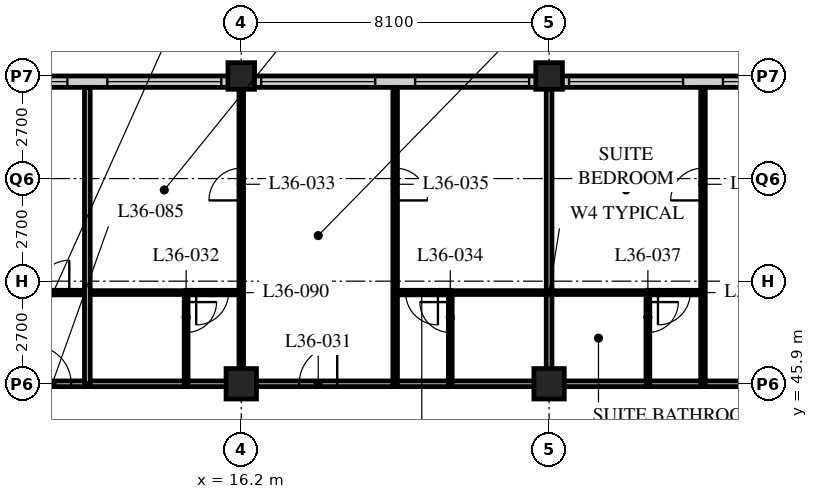
"""IFC4 building model, lengths in metres.
Left out: names, types, materials, properties, quantities, classifications, styles, units other than length and angle.
Written with IfcOpenShell. Run it as: python <this file> out.ifc"""

import sys

from ifc_helpers import new_model, si_unit, direction, frame, frame_2d, origin, origin_2d, place, context, subcontext, project, spatial, rectangle, hollow_rectangle, extrude, element, fill, save


model = new_model("IFC4")
c1 = context("Model", 3, precision=1e-05, world=origin(), true_north=direction((0.0, 1.0)))
c2 = subcontext(c1, "Body", "Model", "MODEL_VIEW")
j1 = project(units=[si_unit("LENGTHUNIT", "METRE"), si_unit("PLANEANGLEUNIT", "RADIAN")], contexts=[c1])
p1 = place(None, origin())
s1 = spatial("IfcSite", under=j1, at=p1, CompositionType="ELEMENT")
p2 = place(p1, origin())
s2 = spatial("IfcBuilding", under=s1, at=p2, CompositionType="ELEMENT")
p3 = place(p2, frame((0.0, 0.0, 140.8)))
s3 = spatial("IfcBuildingStorey", under=s2, at=p3, CompositionType="ELEMENT", Elevation=140.8)
p4 = place(p3, frame((16.2, 45.9, 0.0), z_axis=(0.0, 0.0, 1.0), x_axis=(1.0, 0.0, 0.0)))
e1 = element("IfcColumn", 1, at=p4, inside=s3, PredefinedType="COLUMN", context=c2, shape_type="SweptSolid", body=[
    extrude(hollow_rectangle(XDim=0.8, YDim=0.8, WallThickness=0.08, at=origin_2d()), origin(), (0.0, 0.0, 1.0), 3.4),
])
p5 = place(p3, frame((16.2, 54.0, 0.0), z_axis=(0.0, 0.0, 1.0), x_axis=(1.0, 0.0, 0.0)))
e2 = element("IfcColumn", 2, at=p5, inside=s3, PredefinedType="COLUMN", context=c2, shape_type="SweptSolid", body=[
    extrude(hollow_rectangle(XDim=0.7, YDim=0.7, WallThickness=0.07, at=origin_2d()), origin(), (0.0, 0.0, 1.0), 3.4),
])
p6 = place(p3, frame((24.3, 45.9, 0.0), z_axis=(0.0, 0.0, 1.0), x_axis=(1.0, 0.0, 0.0)))
e3 = element("IfcColumn", 3, at=p6, inside=s3, PredefinedType="COLUMN", context=c2, shape_type="SweptSolid", body=[
    extrude(hollow_rectangle(XDim=0.8, YDim=0.8, WallThickness=0.08, at=origin_2d()), origin(), (0.0, 0.0, 1.0), 3.4),
])
p7 = place(p3, frame((24.3, 54.0, 0.0), z_axis=(0.0, 0.0, 1.0), x_axis=(1.0, 0.0, 0.0)))
e4 = element("IfcColumn", 4, at=p7, inside=s3, PredefinedType="COLUMN", context=c2, shape_type="SweptSolid", body=[
    extrude(hollow_rectangle(XDim=0.7, YDim=0.7, WallThickness=0.07, at=origin_2d()), origin(), (0.0, 0.0, 1.0), 3.4),
])
p8 = place(p3, frame((48.3, 53.85, 0.0), z_axis=(0.0, 0.0, 1.0), x_axis=(-1.0, 0.0, 0.0)))
e5 = element("IfcWall", 5, at=p8, inside=s3, PredefinedType="SOLIDWALL", context=c2, shape_type="SweptSolid", body=[
    extrude(rectangle(XDim=40.2, YDim=0.3, at=frame_2d((20.1, 0.0))), origin(), (0.0, 0.0, 1.0), 3.19),
])
p9 = place(p8, frame((0.225, 0.0, 0.9)))
e6 = element("IfcOpeningElement", 6, at=p9, cuts=e5, PredefinedType="OPENING", context=c2, shape_type="SweptSolid", body=[
    extrude(rectangle(XDim=3.0, YDim=2.0, at=frame_2d((1.5, 1.0))), frame((0.0, 0.16, 0.0), z_axis=(0.0, -1.0, 0.0), x_axis=(1.0, 0.0, 0.0)), (0.0, 0.0, 1.0), 0.32),
])
p10 = place(p8, frame((4.275, 0.0, 0.9)))
e7 = element("IfcOpeningElement", 7, at=p10, cuts=e5, PredefinedType="OPENING", context=c2, shape_type="SweptSolid", body=[
    extrude(rectangle(XDim=3.0, YDim=2.0, at=frame_2d((1.5, 1.0))), frame((0.0, 0.16, 0.0), z_axis=(0.0, -1.0, 0.0), x_axis=(1.0, 0.0, 0.0)), (0.0, 0.0, 1.0), 0.32),
])
p11 = place(p8, frame((8.325, 0.0, 0.9)))
e8 = element("IfcOpeningElement", 8, at=p11, cuts=e5, PredefinedType="OPENING", context=c2, shape_type="SweptSolid", body=[
    extrude(rectangle(XDim=3.0, YDim=2.0, at=frame_2d((1.5, 1.0))), frame((0.0, 0.16, 0.0), z_axis=(0.0, -1.0, 0.0), x_axis=(1.0, 0.0, 0.0)), (0.0, 0.0, 1.0), 0.32),
])
p12 = place(p8, frame((12.375, 0.0, 0.9)))
e9 = element("IfcOpeningElement", 9, at=p12, cuts=e5, PredefinedType="OPENING", context=c2, shape_type="SweptSolid", body=[
    extrude(rectangle(XDim=3.0, YDim=2.0, at=frame_2d((1.5, 1.0))), frame((0.0, 0.16, 0.0), z_axis=(0.0, -1.0, 0.0), x_axis=(1.0, 0.0, 0.0)), (0.0, 0.0, 1.0), 0.32),
])
p13 = place(p8, frame((16.425, 0.0, 0.9)))
e10 = element("IfcOpeningElement", 10, at=p13, cuts=e5, PredefinedType="OPENING", context=c2, shape_type="SweptSolid", body=[
    extrude(rectangle(XDim=3.0, YDim=2.0, at=frame_2d((1.5, 1.0))), frame((0.0, 0.16, 0.0), z_axis=(0.0, -1.0, 0.0), x_axis=(1.0, 0.0, 0.0)), (0.0, 0.0, 1.0), 0.32),
])
p14 = place(p8, frame((20.475, 0.0, 0.9)))
e11 = element("IfcOpeningElement", 11, at=p14, cuts=e5, PredefinedType="OPENING", context=c2, shape_type="SweptSolid", body=[
    extrude(rectangle(XDim=3.0, YDim=2.0, at=frame_2d((1.5, 1.0))), frame((0.0, 0.16, 0.0), z_axis=(0.0, -1.0, 0.0), x_axis=(1.0, 0.0, 0.0)), (0.0, 0.0, 1.0), 0.32),
])
p15 = place(p8, frame((24.525, 0.0, 0.9)))
e12 = element("IfcOpeningElement", 12, at=p15, cuts=e5, PredefinedType="OPENING", context=c2, shape_type="SweptSolid", body=[
    extrude(rectangle(XDim=3.0, YDim=2.0, at=frame_2d((1.5, 1.0))), frame((0.0, 0.16, 0.0), z_axis=(0.0, -1.0, 0.0), x_axis=(1.0, 0.0, 0.0)), (0.0, 0.0, 1.0), 0.32),
])
p16 = place(p8, frame((28.575, 0.0, 0.9)))
e13 = element("IfcOpeningElement", 13, at=p16, cuts=e5, PredefinedType="OPENING", context=c2, shape_type="SweptSolid", body=[
    extrude(rectangle(XDim=3.0, YDim=2.0, at=frame_2d((1.5, 1.0))), frame((0.0, 0.16, 0.0), z_axis=(0.0, -1.0, 0.0), x_axis=(1.0, 0.0, 0.0)), (0.0, 0.0, 1.0), 0.32),
])
p17 = place(p8, frame((32.625, 0.0, 0.9)))
e14 = element("IfcOpeningElement", 14, at=p17, cuts=e5, PredefinedType="OPENING", context=c2, shape_type="SweptSolid", body=[
    extrude(rectangle(XDim=3.0, YDim=2.0, at=frame_2d((1.5, 1.0))), frame((0.0, 0.16, 0.0), z_axis=(0.0, -1.0, 0.0), x_axis=(1.0, 0.0, 0.0)), (0.0, 0.0, 1.0), 0.32),
])
p18 = place(p8, frame((36.675, 0.0, 0.9)))
e15 = element("IfcOpeningElement", 15, at=p18, cuts=e5, PredefinedType="OPENING", context=c2, shape_type="SweptSolid", body=[
    extrude(rectangle(XDim=3.0, YDim=2.0, at=frame_2d((1.5, 1.0))), frame((0.0, 0.16, 0.0), z_axis=(0.0, -1.0, 0.0), x_axis=(1.0, 0.0, 0.0)), (0.0, 0.0, 1.0), 0.32),
])
p19 = place(p3, frame((8.1, 45.9, 0.0), z_axis=(0.0, 0.0, 1.0), x_axis=(1.0, 0.0, 0.0)))
e16 = element("IfcWall", 16, at=p19, inside=s3, PredefinedType="PARTITIONING", context=c2, shape_type="SweptSolid", body=[
    extrude(rectangle(XDim=36.45, YDim=0.15, at=frame_2d((18.225, 0.0))), origin(), (0.0, 0.0, 1.0), 2.578),
])
p20 = place(p19, frame((9.625, 0.0, 0.0)))
e17 = element("IfcOpeningElement", 17, at=p20, cuts=e16, PredefinedType="OPENING", context=c2, shape_type="SweptSolid", body=[
    extrude(rectangle(XDim=1.0, YDim=2.1, at=frame_2d((0.5, 1.05))), frame((0.0, 0.085, 0.0), z_axis=(0.0, -1.0, 0.0), x_axis=(1.0, 0.0, 0.0)), (0.0, 0.0, 1.0), 0.17),
])
p21 = place(p19, frame((21.775, 0.0, 0.0)))
e18 = element("IfcOpeningElement", 18, at=p21, cuts=e16, PredefinedType="OPENING", context=c2, shape_type="SweptSolid", body=[
    extrude(rectangle(XDim=1.0, YDim=2.1, at=frame_2d((0.5, 1.05))), frame((0.0, 0.085, 0.0), z_axis=(0.0, -1.0, 0.0), x_axis=(1.0, 0.0, 0.0)), (0.0, 0.0, 1.0), 0.17),
])
p22 = place(p19, frame((28.95, 0.0, 0.0)))
e19 = element("IfcOpeningElement", 19, at=p22, cuts=e16, PredefinedType="OPENING", context=c2, shape_type="SweptSolid", body=[
    extrude(rectangle(XDim=1.0, YDim=2.1, at=frame_2d((0.5, 1.05))), frame((0.0, 0.085, 0.0), z_axis=(0.0, -1.0, 0.0), x_axis=(1.0, 0.0, 0.0)), (0.0, 0.0, 1.0), 0.17),
])
p23 = place(p19, frame((33.925, 0.0, 0.0)))
e20 = element("IfcOpeningElement", 20, at=p23, cuts=e16, PredefinedType="OPENING", context=c2, shape_type="SweptSolid", body=[
    extrude(rectangle(XDim=1.0, YDim=2.1, at=frame_2d((0.5, 1.05))), frame((0.0, 0.085, 0.0), z_axis=(0.0, -1.0, 0.0), x_axis=(1.0, 0.0, 0.0)), (0.0, 0.0, 1.0), 0.17),
])
p24 = place(p19, frame((2.625, 0.0, 0.0)))
e21 = element("IfcOpeningElement", 21, at=p24, cuts=e16, PredefinedType="OPENING", context=c2, shape_type="SweptSolid", body=[
    extrude(rectangle(XDim=1.0, YDim=2.1, at=frame_2d((0.5, 1.05))), frame((0.0, 0.085, 0.0), z_axis=(0.0, -1.0, 0.0), x_axis=(1.0, 0.0, 0.0)), (0.0, 0.0, 1.0), 0.17),
])
p25 = place(p3, frame((12.15, 48.3, 0.0), z_axis=(0.0, 0.0, 1.0), x_axis=(1.0, 0.0, 0.0)))
e22 = element("IfcWall", 22, at=p25, inside=s3, PredefinedType="PARTITIONING", context=c2, shape_type="SweptSolid", body=[
    extrude(rectangle(XDim=2.6, YDim=0.1, at=frame_2d((1.3, 0.0))), origin(), (0.0, 0.0, 1.0), 3.19),
])
p26 = place(p3, frame((14.75, 45.9, 0.0), z_axis=(0.0, 0.0, 1.0), x_axis=(0.0, 1.0, 0.0)))
e23 = element("IfcWall", 23, at=p26, inside=s3, PredefinedType="PARTITIONING", context=c2, shape_type="SweptSolid", body=[
    extrude(rectangle(XDim=2.4, YDim=0.1, at=frame_2d((1.2, 0.0))), origin(), (0.0, 0.0, 1.0), 3.19),
])
p27 = place(p26, frame((1.35, 0.0, 0.0)))
e24 = element("IfcOpeningElement", 24, at=p27, cuts=e23, PredefinedType="OPENING", context=c2, shape_type="SweptSolid", body=[
    extrude(rectangle(XDim=0.8, YDim=2.1, at=frame_2d((0.4, 1.05))), frame((0.0, 0.06, 0.0), z_axis=(0.0, -1.0, 0.0), x_axis=(1.0, 0.0, 0.0)), (0.0, 0.0, 1.0), 0.12),
])
p28 = place(p3, frame((16.2, 45.9, 0.0), z_axis=(0.0, 0.0, 1.0), x_axis=(0.0, 1.0, 0.0)))
e25 = element("IfcWall", 25, at=p28, inside=s3, PredefinedType="PARTITIONING", context=c2, shape_type="SweptSolid", body=[
    extrude(rectangle(XDim=7.8, YDim=0.12, at=frame_2d((3.9, 0.0))), origin(), (0.0, 0.0, 1.0), 2.578),
])
p29 = place(p28, frame((4.825, 0.0, 0.0)))
e26 = element("IfcOpeningElement", 26, at=p29, cuts=e25, PredefinedType="OPENING", context=c2, shape_type="SweptSolid", body=[
    extrude(rectangle(XDim=0.85, YDim=2.1, at=frame_2d((0.425, 1.05))), frame((0.0, 0.07, 0.0), z_axis=(0.0, -1.0, 0.0), x_axis=(1.0, 0.0, 0.0)), (0.0, 0.0, 1.0), 0.14),
])
p30 = place(p3, frame((21.7, 48.3, 0.0), z_axis=(0.0, 0.0, 1.0), x_axis=(1.0, 0.0, 0.0)))
e27 = element("IfcWall", 27, at=p30, inside=s3, PredefinedType="PARTITIONING", context=c2, shape_type="SweptSolid", body=[
    extrude(rectangle(XDim=5.2, YDim=0.1, at=frame_2d((2.6, 0.0))), origin(), (0.0, 0.0, 1.0), 3.19),
])
p31 = place(p3, frame((21.7, 45.9, 0.0), z_axis=(0.0, 0.0, 1.0), x_axis=(0.0, 1.0, 0.0)))
e28 = element("IfcWall", 28, at=p31, inside=s3, PredefinedType="PARTITIONING", context=c2, shape_type="SweptSolid", body=[
    extrude(rectangle(XDim=2.4, YDim=0.1, at=frame_2d((1.2, 0.0))), origin(), (0.0, 0.0, 1.0), 3.19),
])
p32 = place(p31, frame((1.35, 0.0, 0.0)))
e29 = element("IfcOpeningElement", 29, at=p32, cuts=e28, PredefinedType="OPENING", context=c2, shape_type="SweptSolid", body=[
    extrude(rectangle(XDim=0.8, YDim=2.1, at=frame_2d((0.4, 1.05))), frame((0.0, 0.06, 0.0), z_axis=(0.0, -1.0, 0.0), x_axis=(1.0, 0.0, 0.0)), (0.0, 0.0, 1.0), 0.12),
])
p33 = place(p3, frame((20.25, 45.9, 0.0), z_axis=(0.0, 0.0, 1.0), x_axis=(0.0, 1.0, 0.0)))
e30 = element("IfcWall", 30, at=p33, inside=s3, PredefinedType="PARTITIONING", context=c2, shape_type="SweptSolid", body=[
    extrude(rectangle(XDim=7.8, YDim=0.12, at=frame_2d((3.9, 0.0))), origin(), (0.0, 0.0, 1.0), 3.19),
])
p34 = place(p33, frame((4.825, 0.0, 0.0)))
e31 = element("IfcOpeningElement", 31, at=p34, cuts=e30, PredefinedType="OPENING", context=c2, shape_type="SweptSolid", body=[
    extrude(rectangle(XDim=0.85, YDim=2.1, at=frame_2d((0.425, 1.05))), frame((0.0, 0.07, 0.0), z_axis=(0.0, -1.0, 0.0), x_axis=(1.0, 0.0, 0.0)), (0.0, 0.0, 1.0), 0.14),
])
p35 = place(p3, frame((24.3, 45.9, 0.0), z_axis=(0.0, 0.0, 1.0), x_axis=(0.0, 1.0, 0.0)))
e32 = element("IfcWall", 32, at=p35, inside=s3, PredefinedType="PARTITIONING", context=c2, shape_type="SweptSolid", body=[
    extrude(rectangle(XDim=7.8, YDim=0.15, at=frame_2d((3.9, 0.0))), origin(), (0.0, 0.0, 1.0), 2.578),
])
p36 = place(p3, frame((26.9, 45.9, 0.0), z_axis=(0.0, 0.0, 1.0), x_axis=(0.0, 1.0, 0.0)))
e33 = element("IfcWall", 33, at=p36, inside=s3, PredefinedType="PARTITIONING", context=c2, shape_type="SweptSolid", body=[
    extrude(rectangle(XDim=2.4, YDim=0.1, at=frame_2d((1.2, 0.0))), origin(), (0.0, 0.0, 1.0), 3.19),
])
p37 = place(p36, frame((1.35, 0.0, 0.0)))
e34 = element("IfcOpeningElement", 34, at=p37, cuts=e33, PredefinedType="OPENING", context=c2, shape_type="SweptSolid", body=[
    extrude(rectangle(XDim=0.8, YDim=2.1, at=frame_2d((0.4, 1.05))), frame((0.0, 0.06, 0.0), z_axis=(0.0, -1.0, 0.0), x_axis=(1.0, 0.0, 0.0)), (0.0, 0.0, 1.0), 0.12),
])
p38 = place(p3, frame((28.35, 45.9, 0.0), z_axis=(0.0, 0.0, 1.0), x_axis=(0.0, 1.0, 0.0)))
e35 = element("IfcWall", 35, at=p38, inside=s3, PredefinedType="PARTITIONING", context=c2, shape_type="SweptSolid", body=[
    extrude(rectangle(XDim=7.8, YDim=0.12, at=frame_2d((3.9, 0.0))), origin(), (0.0, 0.0, 1.0), 3.19),
])
p39 = place(p38, frame((4.825, 0.0, 0.0)))
e36 = element("IfcOpeningElement", 36, at=p39, cuts=e35, PredefinedType="OPENING", context=c2, shape_type="SweptSolid", body=[
    extrude(rectangle(XDim=0.85, YDim=2.1, at=frame_2d((0.425, 1.05))), frame((0.0, 0.07, 0.0), z_axis=(0.0, -1.0, 0.0), x_axis=(1.0, 0.0, 0.0)), (0.0, 0.0, 1.0), 0.14),
])
p40 = place(p3, frame((8.1, 48.3, 0.0), z_axis=(0.0, 0.0, 1.0), x_axis=(1.0, 0.0, 0.0)))
e37 = element("IfcWall", 37, at=p40, inside=s3, PredefinedType="PARTITIONING", context=c2, shape_type="SweptSolid", body=[
    extrude(rectangle(XDim=4.05, YDim=0.12, at=frame_2d((2.025, 0.0))), origin(), (0.0, 0.0, 1.0), 3.19),
])
p41 = place(p40, frame((2.725, 0.0, 0.0)))
e38 = element("IfcOpeningElement", 38, at=p41, cuts=e37, PredefinedType="OPENING", context=c2, shape_type="SweptSolid", body=[
    extrude(rectangle(XDim=0.85, YDim=2.1, at=frame_2d((0.425, 1.05))), frame((0.0, 0.07, 0.0), z_axis=(0.0, -1.0, 0.0), x_axis=(1.0, 0.0, 0.0)), (0.0, 0.0, 1.0), 0.14),
])
p42 = place(p3, frame((12.15, 45.9, 0.0), z_axis=(0.0, 0.0, 1.0), x_axis=(0.0, 1.0, 0.0)))
e39 = element("IfcWall", 39, at=p42, inside=s3, PredefinedType="PARTITIONING", context=c2, shape_type="SweptSolid", body=[
    extrude(rectangle(XDim=7.8, YDim=0.15, at=frame_2d((3.9, 0.0))), origin(), (0.0, 0.0, 1.0), 3.19),
])
p43 = place(p3, frame((14.74, 48.3, 0.0), z_axis=(0.0, 0.0, 1.0), x_axis=(1.0, 0.0, 0.0)))
e40 = element("IfcWall", 40, at=p43, inside=s3, PredefinedType="PARTITIONING", context=c2, shape_type="SweptSolid", body=[
    extrude(rectangle(XDim=1.46, YDim=0.12, at=frame_2d((0.73, 0.0))), origin(), (0.0, 0.0, 1.0), 3.19),
])
p44 = place(p43, frame((0.275, 0.0, 0.0)))
e41 = element("IfcOpeningElement", 41, at=p44, cuts=e40, PredefinedType="OPENING", context=c2, shape_type="SweptSolid", body=[
    extrude(rectangle(XDim=0.85, YDim=2.1, at=frame_2d((0.425, 1.05))), frame((0.0, 0.07, 0.0), z_axis=(0.0, -1.0, 0.0), x_axis=(1.0, 0.0, 0.0)), (0.0, 0.0, 1.0), 0.14),
])
p45 = place(p3, frame((20.25, 48.3, 0.0), z_axis=(0.0, 0.0, 1.0), x_axis=(1.0, 0.0, 0.0)))
e42 = element("IfcWall", 42, at=p45, inside=s3, PredefinedType="PARTITIONING", context=c2, shape_type="SweptSolid", body=[
    extrude(rectangle(XDim=1.46, YDim=0.12, at=frame_2d((0.73, 0.0))), origin(), (0.0, 0.0, 1.0), 3.19),
])
p46 = place(p45, frame((0.275, 0.0, 0.0)))
e43 = element("IfcOpeningElement", 43, at=p46, cuts=e42, PredefinedType="OPENING", context=c2, shape_type="SweptSolid", body=[
    extrude(rectangle(XDim=0.85, YDim=2.1, at=frame_2d((0.425, 1.05))), frame((0.0, 0.07, 0.0), z_axis=(0.0, -1.0, 0.0), x_axis=(1.0, 0.0, 0.0)), (0.0, 0.0, 1.0), 0.14),
])
p47 = place(p3, frame((26.89, 48.3, 0.0), z_axis=(0.0, 0.0, 1.0), x_axis=(1.0, 0.0, 0.0)))
e44 = element("IfcWall", 44, at=p47, inside=s3, PredefinedType="PARTITIONING", context=c2, shape_type="SweptSolid", body=[
    extrude(rectangle(XDim=1.46, YDim=0.12, at=frame_2d((0.73, 0.0))), origin(), (0.0, 0.0, 1.0), 3.19),
])
p48 = place(p47, frame((0.275, 0.0, 0.0)))
e45 = element("IfcOpeningElement", 45, at=p48, cuts=e44, PredefinedType="OPENING", context=c2, shape_type="SweptSolid", body=[
    extrude(rectangle(XDim=0.85, YDim=2.1, at=frame_2d((0.425, 1.05))), frame((0.0, 0.07, 0.0), z_axis=(0.0, -1.0, 0.0), x_axis=(1.0, 0.0, 0.0)), (0.0, 0.0, 1.0), 0.14),
])
p49 = place(p13, origin())
e46 = element("IfcWindow", 46, at=p49, inside=s3, PartitioningType="SINGLE_PANEL", PredefinedType="WINDOW", context=c2, shape_type="SweptSolid", body=[
    extrude(rectangle(XDim=3.0, YDim=2.0, at=frame_2d((1.5, 1.0))), frame((0.0, 0.03, 0.0), z_axis=(0.0, -1.0, 0.0), x_axis=(1.0, 0.0, 0.0)), (0.0, 0.0, 1.0), 0.06),
])
fill(e10, e46)
p50 = place(p14, origin())
e47 = element("IfcWindow", 47, at=p50, inside=s3, PartitioningType="SINGLE_PANEL", PredefinedType="WINDOW", context=c2, shape_type="SweptSolid", body=[
    extrude(rectangle(XDim=3.0, YDim=2.0, at=frame_2d((1.5, 1.0))), frame((0.0, 0.03, 0.0), z_axis=(0.0, -1.0, 0.0), x_axis=(1.0, 0.0, 0.0)), (0.0, 0.0, 1.0), 0.06),
])
fill(e11, e47)
p51 = place(p15, origin())
e48 = element("IfcWindow", 48, at=p51, inside=s3, PartitioningType="SINGLE_PANEL", PredefinedType="WINDOW", context=c2, shape_type="SweptSolid", body=[
    extrude(rectangle(XDim=3.0, YDim=2.0, at=frame_2d((1.5, 1.0))), frame((0.0, 0.03, 0.0), z_axis=(0.0, -1.0, 0.0), x_axis=(1.0, 0.0, 0.0)), (0.0, 0.0, 1.0), 0.06),
])
fill(e12, e48)
p52 = place(p16, origin())
e49 = element("IfcWindow", 49, at=p52, inside=s3, PartitioningType="SINGLE_PANEL", PredefinedType="WINDOW", context=c2, shape_type="SweptSolid", body=[
    extrude(rectangle(XDim=3.0, YDim=2.0, at=frame_2d((1.5, 1.0))), frame((0.0, 0.03, 0.0), z_axis=(0.0, -1.0, 0.0), x_axis=(1.0, 0.0, 0.0)), (0.0, 0.0, 1.0), 0.06),
])
fill(e13, e49)
p53 = place(p17, origin())
e50 = element("IfcWindow", 50, at=p53, inside=s3, PartitioningType="SINGLE_PANEL", PredefinedType="WINDOW", context=c2, shape_type="SweptSolid", body=[
    extrude(rectangle(XDim=3.0, YDim=2.0, at=frame_2d((1.5, 1.0))), frame((0.0, 0.03, 0.0), z_axis=(0.0, -1.0, 0.0), x_axis=(1.0, 0.0, 0.0)), (0.0, 0.0, 1.0), 0.06),
])
fill(e14, e50)
p54 = place(p18, origin())
e51 = element("IfcWindow", 51, at=p54, inside=s3, PartitioningType="SINGLE_PANEL", PredefinedType="WINDOW", context=c2, shape_type="SweptSolid", body=[
    extrude(rectangle(XDim=3.0, YDim=2.0, at=frame_2d((1.5, 1.0))), frame((0.0, 0.03, 0.0), z_axis=(0.0, -1.0, 0.0), x_axis=(1.0, 0.0, 0.0)), (0.0, 0.0, 1.0), 0.06),
])
fill(e15, e51)
p55 = place(p20, origin())
e52 = element("IfcDoor", 52, at=p55, inside=s3, OperationType="SINGLE_SWING_RIGHT", PredefinedType="DOOR", context=c2, shape_type="SweptSolid", body=[
    extrude(rectangle(XDim=1.0, YDim=2.1, at=frame_2d((0.5, 1.05))), frame((0.0, 0.025, 0.0), z_axis=(0.0, -1.0, 0.0), x_axis=(1.0, 0.0, 0.0)), (0.0, 0.0, 1.0), 0.05),
])
fill(e17, e52)
p56 = place(p27, origin())
e53 = element("IfcDoor", 53, at=p56, inside=s3, OperationType="SINGLE_SWING_LEFT", PredefinedType="DOOR", context=c2, shape_type="SweptSolid", body=[
    extrude(rectangle(XDim=0.8, YDim=2.1, at=frame_2d((0.4, 1.05))), frame((0.0, 0.025, 0.0), z_axis=(0.0, -1.0, 0.0), x_axis=(1.0, 0.0, 0.0)), (0.0, 0.0, 1.0), 0.05),
])
fill(e24, e53)
p57 = place(p29, origin())
e54 = element("IfcDoor", 54, at=p57, inside=s3, OperationType="SINGLE_SWING_LEFT", PredefinedType="DOOR", context=c2, shape_type="SweptSolid", body=[
    extrude(rectangle(XDim=0.85, YDim=2.1, at=frame_2d((0.425, 1.05))), frame((0.0, 0.025, 0.0), z_axis=(0.0, -1.0, 0.0), x_axis=(1.0, 0.0, 0.0)), (0.0, 0.0, 1.0), 0.05),
])
fill(e26, e54)
p58 = place(p32, origin())
e55 = element("IfcDoor", 55, at=p58, inside=s3, OperationType="SINGLE_SWING_RIGHT", PredefinedType="DOOR", context=c2, shape_type="SweptSolid", body=[
    extrude(rectangle(XDim=0.8, YDim=2.1, at=frame_2d((0.4, 1.05))), frame((0.0, 0.025, 0.0), z_axis=(0.0, -1.0, 0.0), x_axis=(1.0, 0.0, 0.0)), (0.0, 0.0, 1.0), 0.05),
])
fill(e29, e55)
p59 = place(p34, origin())
e56 = element("IfcDoor", 56, at=p59, inside=s3, OperationType="SINGLE_SWING_RIGHT", PredefinedType="DOOR", context=c2, shape_type="SweptSolid", body=[
    extrude(rectangle(XDim=0.85, YDim=2.1, at=frame_2d((0.425, 1.05))), frame((0.0, 0.025, 0.0), z_axis=(0.0, -1.0, 0.0), x_axis=(1.0, 0.0, 0.0)), (0.0, 0.0, 1.0), 0.05),
])
fill(e31, e56)
p60 = place(p37, origin())
e57 = element("IfcDoor", 57, at=p60, inside=s3, OperationType="SINGLE_SWING_LEFT", PredefinedType="DOOR", context=c2, shape_type="SweptSolid", body=[
    extrude(rectangle(XDim=0.8, YDim=2.1, at=frame_2d((0.4, 1.05))), frame((0.0, 0.025, 0.0), z_axis=(0.0, -1.0, 0.0), x_axis=(1.0, 0.0, 0.0)), (0.0, 0.0, 1.0), 0.05),
])
fill(e34, e57)
p61 = place(p39, origin())
e58 = element("IfcDoor", 58, at=p61, inside=s3, OperationType="SINGLE_SWING_LEFT", PredefinedType="DOOR", context=c2, shape_type="SweptSolid", body=[
    extrude(rectangle(XDim=0.85, YDim=2.1, at=frame_2d((0.425, 1.05))), frame((0.0, 0.025, 0.0), z_axis=(0.0, -1.0, 0.0), x_axis=(1.0, 0.0, 0.0)), (0.0, 0.0, 1.0), 0.05),
])
fill(e36, e58)
p62 = place(p24, origin())
e59 = element("IfcDoor", 59, at=p62, inside=s3, OperationType="SINGLE_SWING_LEFT", PredefinedType="DOOR", context=c2, shape_type="SweptSolid", body=[
    extrude(rectangle(XDim=1.0, YDim=2.1, at=frame_2d((0.5, 1.05))), frame((0.0, 0.025, 0.0), z_axis=(0.0, -1.0, 0.0), x_axis=(1.0, 0.0, 0.0)), (0.0, 0.0, 1.0), 0.05),
])
fill(e21, e59)
p63 = place(p41, origin())
e60 = element("IfcDoor", 60, at=p63, inside=s3, OperationType="SINGLE_SWING_RIGHT", PredefinedType="DOOR", context=c2, shape_type="SweptSolid", body=[
    extrude(rectangle(XDim=0.85, YDim=2.1, at=frame_2d((0.425, 1.05))), frame((0.0, 0.025, 0.0), z_axis=(0.0, -1.0, 0.0), x_axis=(1.0, 0.0, 0.0)), (0.0, 0.0, 1.0), 0.05),
])
fill(e38, e60)
p64 = place(p44, origin())
e61 = element("IfcDoor", 61, at=p64, inside=s3, OperationType="SINGLE_SWING_RIGHT", PredefinedType="DOOR", context=c2, shape_type="SweptSolid", body=[
    extrude(rectangle(XDim=0.85, YDim=2.1, at=frame_2d((0.425, 1.05))), frame((0.0, 0.025, 0.0), z_axis=(0.0, -1.0, 0.0), x_axis=(1.0, 0.0, 0.0)), (0.0, 0.0, 1.0), 0.05),
])
fill(e41, e61)
p65 = place(p46, origin())
e62 = element("IfcDoor", 62, at=p65, inside=s3, OperationType="SINGLE_SWING_LEFT", PredefinedType="DOOR", context=c2, shape_type="SweptSolid", body=[
    extrude(rectangle(XDim=0.85, YDim=2.1, at=frame_2d((0.425, 1.05))), frame((0.0, 0.025, 0.0), z_axis=(0.0, -1.0, 0.0), x_axis=(1.0, 0.0, 0.0)), (0.0, 0.0, 1.0), 0.05),
])
fill(e43, e62)
p66 = place(p48, origin())
e63 = element("IfcDoor", 63, at=p66, inside=s3, OperationType="SINGLE_SWING_RIGHT", PredefinedType="DOOR", context=c2, shape_type="SweptSolid", body=[
    extrude(rectangle(XDim=0.85, YDim=2.1, at=frame_2d((0.425, 1.05))), frame((0.0, 0.025, 0.0), z_axis=(0.0, -1.0, 0.0), x_axis=(1.0, 0.0, 0.0)), (0.0, 0.0, 1.0), 0.05),
])
fill(e45, e63)
save(model, sys.argv[1])
